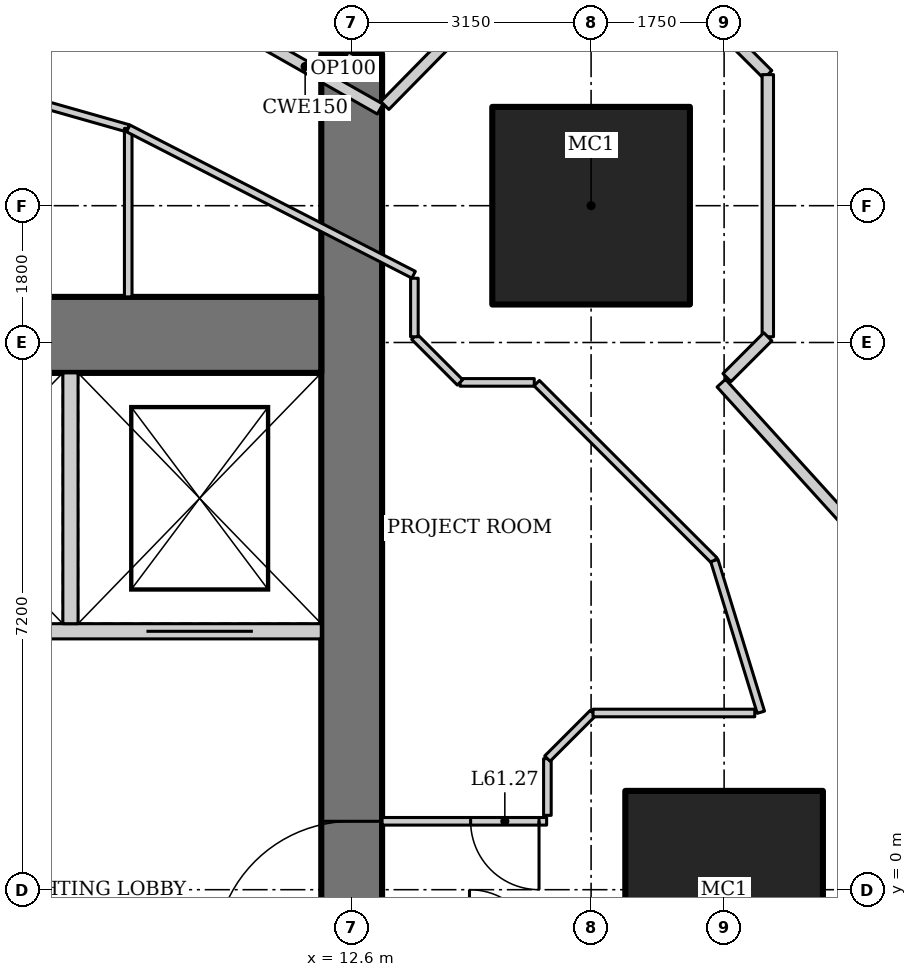
"""IFC4 building model, lengths in metres.
Left out: names, types, materials, properties, quantities, classifications, styles, units other than length and angle.
Written with IfcOpenShell. Run it as: python <this file> out.ifc"""

import sys

from ifc_helpers import new_model, si_unit, direction, frame, frame_2d, origin, origin_2d, place, context, subcontext, project, spatial, rectangle, hollow_rectangle, extrude, element, fill, save


model = new_model("IFC4")
c1 = context("Model", 3, precision=1e-05, world=origin(), true_north=direction((0.0, 1.0)))
c2 = subcontext(c1, "Body", "Model", "MODEL_VIEW")
j1 = project(units=[si_unit("LENGTHUNIT", "METRE"), si_unit("PLANEANGLEUNIT", "RADIAN")], contexts=[c1])
p1 = place(None, origin())
s1 = spatial("IfcSite", under=j1, at=p1, CompositionType="ELEMENT")
p2 = place(p1, origin())
s2 = spatial("IfcBuilding", under=s1, at=p2, CompositionType="ELEMENT")
p3 = place(p2, frame((0.0, 0.0, 262.0)))
s3 = spatial("IfcBuildingStorey", under=s2, at=p3, CompositionType="ELEMENT", Elevation=262.0)
for number, where, z_axis, x_axis in (
    (1, (17.5, 0.0, 0.0), (0.0, 0.0, 1.0), (1.0, 0.0, 0.0)),
    (2, (15.75, 9.0, 0.0), (0.0, 0.0, 1.0), (1.0, 0.0, 0.0)),
):
    element("IfcColumn", number, at=place(p3, frame(where, z_axis=z_axis, x_axis=x_axis)), inside=s3, PredefinedType="COLUMN", context=c2, shape_type="SweptSolid", body=[
        extrude(hollow_rectangle(XDim=2.6, YDim=2.6, WallThickness=0.13, at=origin_2d()), origin(), (0.0, 0.0, 1.0), 4.2),
    ])
p4 = place(p3, frame((12.6, -11.0, 0.0), z_axis=(0.0, 0.0, 1.0), x_axis=(0.0, 1.0, 0.0)))
e3 = element("IfcWall", 3, at=p4, inside=s3, PredefinedType="SHEAR", context=c2, shape_type="SweptSolid", body=[
    extrude(rectangle(XDim=22.0, YDim=0.8, at=frame_2d((11.0, 0.0))), origin(), (0.0, 0.0, 1.0), 4.2),
])
p5 = place(p4, frame((10.1, 0.0, 0.0)))
e4 = element("IfcOpeningElement", 4, at=p5, cuts=e3, PredefinedType="OPENING", context=c2, shape_type="SweptSolid", body=[
    extrude(rectangle(XDim=1.8, YDim=2.1, at=frame_2d((0.9, 1.05))), frame((0.0, 0.41, 0.0), z_axis=(0.0, -1.0, 0.0), x_axis=(1.0, 0.0, 0.0)), (0.0, 0.0, 1.0), 0.82),
])
p6 = place(p3, frame((12.2, 7.3, 0.0), z_axis=(0.0, 0.0, 1.0), x_axis=(-1.0, 0.0, 0.0)))
e5 = element("IfcWall", 5, at=p6, inside=s3, PredefinedType="SHEAR", context=c2, shape_type="SweptSolid", body=[
    extrude(rectangle(XDim=6.6, YDim=1.0, at=frame_2d((3.3, 0.0))), origin(), (0.0, 0.0, 1.0), 4.2),
])
p7 = place(p3, frame((12.2, 3.4, 0.0), z_axis=(0.0, 0.0, 1.0), x_axis=(-1.0, 0.0, 0.0)))
e6 = element("IfcWall", 6, at=p7, inside=s3, PredefinedType="SOLIDWALL", context=c2, shape_type="SweptSolid", body=[
    extrude(rectangle(XDim=6.6, YDim=0.2, at=frame_2d((3.3, 0.0))), origin(), (0.0, 0.0, 1.0), 4.2),
])
p8 = place(p7, frame((4.45, 0.0, 0.0)))
e7 = element("IfcOpeningElement", 7, at=p8, cuts=e6, PredefinedType="OPENING", context=c2, shape_type="SweptSolid", body=[
    extrude(rectangle(XDim=1.1, YDim=2.2, at=frame_2d((0.55, 1.1))), frame((0.0, 0.11, 0.0), z_axis=(0.0, -1.0, 0.0), x_axis=(1.0, 0.0, 0.0)), (0.0, 0.0, 1.0), 0.22),
])
p9 = place(p7, frame((0.9, 0.0, 0.0)))
e8 = element("IfcOpeningElement", 8, at=p9, cuts=e6, PredefinedType="OPENING", context=c2, shape_type="SweptSolid", body=[
    extrude(rectangle(XDim=1.4, YDim=2.2, at=frame_2d((0.7, 1.1))), frame((0.0, 0.11, 0.0), z_axis=(0.0, -1.0, 0.0), x_axis=(1.0, 0.0, 0.0)), (0.0, 0.0, 1.0), 0.22),
])
p10 = place(p3, frame((8.9, 3.5, 0.0), z_axis=(0.0, 0.0, 1.0), x_axis=(0.0, 1.0, 0.0)))
e9 = element("IfcWall", 9, at=p10, inside=s3, PredefinedType="SOLIDWALL", context=c2, shape_type="SweptSolid", body=[
    extrude(rectangle(XDim=3.3, YDim=0.2, at=frame_2d((1.65, 0.0))), origin(), (0.0, 0.0, 1.0), 4.2),
])
p11 = place(p3, frame((5.68, 11.147, 0.0), z_axis=(0.0, 0.0, 1.0), x_axis=(0.961970251804, -0.27315423234, 0.0)))
e10 = element("IfcWall", 10, at=p11, inside=s3, PredefinedType="PARTITIONING", context=c2, shape_type="SweptSolid", body=[
    extrude(rectangle(XDim=4.137, YDim=0.1, at=frame_2d((2.069, 0.0))), origin(), (0.0, 0.0, 1.0), 4.05),
])
p12 = place(p3, frame((9.66, 10.017, 0.0), z_axis=(0.0, 0.0, 1.0), x_axis=(0.0, -1.0, 0.0)))
e11 = element("IfcWall", 11, at=p12, inside=s3, PredefinedType="PARTITIONING", context=c2, shape_type="SweptSolid", body=[
    extrude(rectangle(XDim=2.217, YDim=0.1, at=frame_2d((1.108, 0.0))), origin(), (0.0, 0.0, 1.0), 4.05),
])
p13 = place(p3, frame((12.6, 11.0, 0.0), z_axis=(0.0, 0.0, 1.0), x_axis=(-0.493794495037, -0.869578631678, 0.0)))
e12 = element("IfcWall", 12, at=p13, inside=s3, PredefinedType="PARTITIONING", context=c2, shape_type="SweptSolid", body=[
    extrude(rectangle(XDim=0.449, YDim=0.1, at=frame_2d((0.225, 0.0))), origin(), (0.0, 0.0, 1.0), 4.05),
])
p14 = place(p3, frame((19.172, 4.78, 0.0), z_axis=(0.0, 0.0, 1.0), x_axis=(-0.671721890643, 0.74080341632, 0.0)))
e13 = element("IfcWall", 13, at=p14, inside=s3, PredefinedType="PARTITIONING", context=c2, shape_type="SweptSolid", body=[
    extrude(rectangle(XDim=2.544, YDim=0.15, at=frame_2d((1.272, 0.0))), origin(), (0.0, 0.0, 1.0), 4.05),
])
p15 = place(p3, frame((12.975, 10.271, 0.0), z_axis=(0.0, 0.0, 1.0), x_axis=(-0.869722107117, 0.493541747366, 0.0)))
e14 = element("IfcWall", 14, at=p15, inside=s3, PredefinedType="PARTITIONING", context=c2, shape_type="SweptSolid", body=[
    extrude(rectangle(XDim=2.27, YDim=0.15, at=frame_2d((1.135, 0.0))), origin(), (0.0, 0.0, 1.0), 4.05),
])
p16 = place(p3, frame((9.66, 10.017, 0.0), z_axis=(0.0, 0.0, 1.0), x_axis=(0.889833724874, -0.456284935185, 0.0)))
e15 = element("IfcWall", 15, at=p16, inside=s3, PredefinedType="PARTITIONING", context=c2, shape_type="SweptSolid", body=[
    extrude(rectangle(XDim=4.22, YDim=0.1, at=frame_2d((2.11, 0.0))), origin(), (0.0, 0.0, 1.0), 4.05),
])
p17 = place(p3, frame((15.035, 6.665, 0.0), z_axis=(0.0, 0.0, 1.0), x_axis=(0.707587114823, -0.70662612104, 0.0)))
e16 = element("IfcWall", 16, at=p17, inside=s3, PredefinedType="PARTITIONING", context=c2, shape_type="SweptSolid", body=[
    extrude(rectangle(XDim=3.303, YDim=0.1, at=frame_2d((1.651, 0.0))), origin(), (0.0, 0.0, 1.0), 4.05),
])
p18 = place(p3, frame((15.002, 6.675, 0.0), z_axis=(0.0, 0.0, 1.0), x_axis=(-1.0, 0.0, 0.0)))
e17 = element("IfcWall", 17, at=p18, inside=s3, PredefinedType="PARTITIONING", context=c2, shape_type="SweptSolid", body=[
    extrude(rectangle(XDim=0.977, YDim=0.1, at=frame_2d((0.488, 0.0))), origin(), (0.0, 0.0, 1.0), 4.05),
])
p19 = place(p3, frame((14.025, 6.675, 0.0), z_axis=(0.0, 0.0, 1.0), x_axis=(-0.707106781187, 0.707106781187, 0.0)))
e18 = element("IfcWall", 18, at=p19, inside=s3, PredefinedType="PARTITIONING", context=c2, shape_type="SweptSolid", body=[
    extrude(rectangle(XDim=0.849, YDim=0.1, at=frame_2d((0.425, 0.0))), origin(), (0.0, 0.0, 1.0), 4.05),
])
p20 = place(p3, frame((13.425, 7.275, 0.0), z_axis=(0.0, 0.0, 1.0), x_axis=(0.0, 1.0, 0.0)))
e19 = element("IfcWall", 19, at=p20, inside=s3, PredefinedType="PARTITIONING", context=c2, shape_type="SweptSolid", body=[
    extrude(rectangle(XDim=0.77, YDim=0.1, at=frame_2d((0.385, 0.0))), origin(), (0.0, 0.0, 1.0), 4.05),
])
p21 = place(p3, frame((13.036, 10.319, 0.0), z_axis=(0.0, 0.0, 1.0), x_axis=(0.701113567316, 0.713049623606, 0.0)))
e20 = element("IfcWall", 20, at=p21, inside=s3, PredefinedType="PARTITIONING", context=c2, shape_type="SweptSolid", body=[
    extrude(rectangle(XDim=1.411, YDim=0.15, at=frame_2d((0.706, 0.0))), origin(), (0.0, 0.0, 1.0), 4.05),
])
p22 = place(p3, frame((17.475, 11.325, 0.0), z_axis=(0.0, 0.0, 1.0), x_axis=(0.707106781187, -0.707106781187, 0.0)))
e21 = element("IfcWall", 21, at=p22, inside=s3, PredefinedType="PARTITIONING", context=c2, shape_type="SweptSolid", body=[
    extrude(rectangle(XDim=0.849, YDim=0.15, at=frame_2d((0.425, 0.0))), origin(), (0.0, 0.0, 1.0), 4.05),
])
p23 = place(p3, frame((18.075, 10.725, 0.0), z_axis=(0.0, 0.0, 1.0), x_axis=(0.0, -1.0, 0.0)))
e22 = element("IfcWall", 22, at=p23, inside=s3, PredefinedType="PARTITIONING", context=c2, shape_type="SweptSolid", body=[
    extrude(rectangle(XDim=3.449, YDim=0.15, at=frame_2d((1.725, 0.0))), origin(), (0.0, 0.0, 1.0), 3.6),
])
p24 = place(p3, frame((18.075, 7.275, 0.0), z_axis=(0.0, 0.0, 1.0), x_axis=(-0.707106781187, -0.707106781187, 0.0)))
e23 = element("IfcWall", 23, at=p24, inside=s3, PredefinedType="PARTITIONING", context=c2, shape_type="SweptSolid", body=[
    extrude(rectangle(XDim=0.76, YDim=0.15, at=frame_2d((0.38, 0.0))), origin(), (0.0, 0.0, 1.0), 4.05),
])
p25 = place(p3, frame((17.372, 4.331, 0.0), z_axis=(0.0, 0.0, 1.0), x_axis=(0.293231279211, -0.956041535129, 0.0)))
e24 = element("IfcWall", 24, at=p25, inside=s3, PredefinedType="PARTITIONING", context=c2, shape_type="SweptSolid", body=[
    extrude(rectangle(XDim=2.088, YDim=0.1, at=frame_2d((1.044, 0.0))), origin(), (0.0, 0.0, 1.0), 4.05),
])
p26 = place(p3, frame((15.165, 0.9, 0.0), z_axis=(0.0, 0.0, 1.0), x_axis=(-1.0, 0.0, 0.0)))
e25 = element("IfcWall", 25, at=p26, inside=s3, PredefinedType="PARTITIONING", context=c2, shape_type="SweptSolid", body=[
    extrude(rectangle(XDim=2.165, YDim=0.1, at=frame_2d((1.083, 0.0))), origin(), (0.0, 0.0, 1.0), 4.05),
])
p27 = place(p26, frame((0.1, 0.0, 0.0)))
e26 = element("IfcOpeningElement", 26, at=p27, cuts=e25, PredefinedType="OPENING", context=c2, shape_type="SweptSolid", body=[
    extrude(rectangle(XDim=0.9, YDim=2.1, at=frame_2d((0.45, 1.05))), frame((0.0, 0.06, 0.0), z_axis=(0.0, -1.0, 0.0), x_axis=(1.0, 0.0, 0.0)), (0.0, 0.0, 1.0), 0.12),
])
p28 = place(p3, frame((15.175, 0.978, 0.0), z_axis=(0.0, 0.0, 1.0), x_axis=(0.0, 1.0, 0.0)))
e27 = element("IfcWall", 27, at=p28, inside=s3, PredefinedType="PARTITIONING", context=c2, shape_type="SweptSolid", body=[
    extrude(rectangle(XDim=0.746, YDim=0.1, at=frame_2d((0.373, 0.0))), origin(), (0.0, 0.0, 1.0), 4.05),
])
p29 = place(p3, frame((15.175, 1.725, 0.0), z_axis=(0.0, 0.0, 1.0), x_axis=(0.707106781187, 0.707106781187, 0.0)))
e28 = element("IfcWall", 28, at=p29, inside=s3, PredefinedType="PARTITIONING", context=c2, shape_type="SweptSolid", body=[
    extrude(rectangle(XDim=0.849, YDim=0.1, at=frame_2d((0.425, 0.0))), origin(), (0.0, 0.0, 1.0), 4.05),
])
p30 = place(p3, frame((15.775, 2.325, 0.0), z_axis=(0.0, 0.0, 1.0), x_axis=(1.0, 0.0, 0.0)))
e29 = element("IfcWall", 29, at=p30, inside=s3, PredefinedType="PARTITIONING", context=c2, shape_type="SweptSolid", body=[
    extrude(rectangle(XDim=2.128, YDim=0.1, at=frame_2d((1.064, 0.0))), origin(), (0.0, 0.0, 1.0), 4.05),
])
p31 = place(p5, origin())
e30 = element("IfcDoor", 30, at=p31, inside=s3, OperationType="DOUBLE_DOOR_DOUBLE_SWING", PredefinedType="DOOR", context=c2, shape_type="SweptSolid", body=[
    extrude(rectangle(XDim=1.8, YDim=2.1, at=frame_2d((0.9, 1.05))), frame((0.0, 0.025, 0.0), z_axis=(0.0, -1.0, 0.0), x_axis=(1.0, 0.0, 0.0)), (0.0, 0.0, 1.0), 0.05),
])
fill(e4, e30)
p32 = place(p9, origin())
e31 = element("IfcDoor", 31, at=p32, inside=s3, OperationType="DOUBLE_DOOR_SLIDING", PredefinedType="DOOR", context=c2, shape_type="SweptSolid", body=[
    extrude(rectangle(XDim=1.4, YDim=2.2, at=frame_2d((0.7, 1.1))), frame((0.0, 0.025, 0.0), z_axis=(0.0, -1.0, 0.0), x_axis=(1.0, 0.0, 0.0)), (0.0, 0.0, 1.0), 0.05),
])
fill(e8, e31)
p33 = place(p27, origin())
e32 = element("IfcDoor", 32, at=p33, inside=s3, OperationType="SINGLE_SWING_LEFT", PredefinedType="DOOR", context=c2, shape_type="SweptSolid", body=[
    extrude(rectangle(XDim=0.9, YDim=2.1, at=frame_2d((0.45, 1.05))), frame((0.0, 0.025, 0.0), z_axis=(0.0, -1.0, 0.0), x_axis=(1.0, 0.0, 0.0)), (0.0, 0.0, 1.0), 0.05),
])
fill(e26, e32)
save(model, sys.argv[1])
